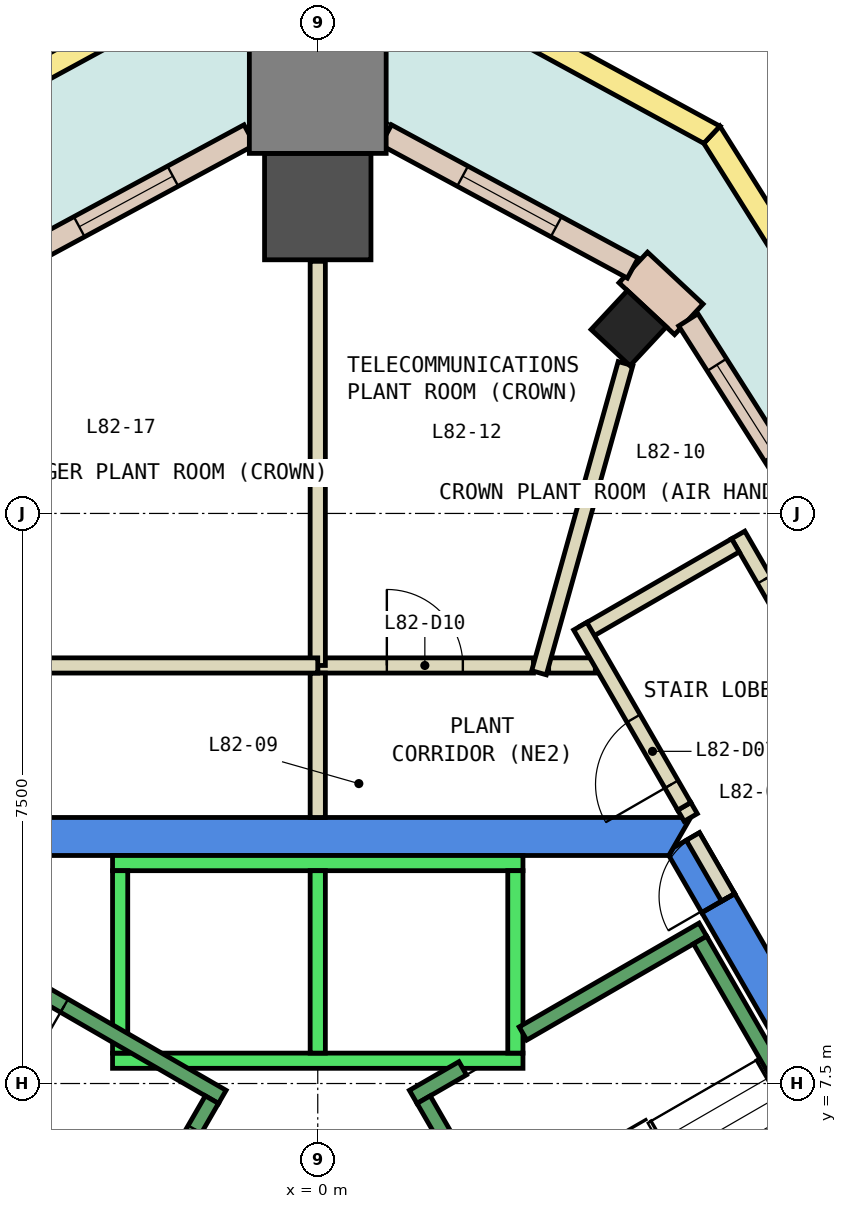
"""IFC4 building model, lengths in metres.
Left out: names, types, materials, properties, quantities, classifications, styles, units other than length and angle.
Written with IfcOpenShell. Run it as: python <this file> out.ifc"""

import sys

from ifc_helpers import new_model, si_unit, direction, frame, frame_2d, origin, origin_2d, place, context, subcontext, project, spatial, polyline, rectangle, outline, extrude, element, fill, save


model = new_model("IFC4")
c1 = context("Model", 3, precision=1e-05, world=origin(), true_north=direction((0.0, 1.0)))
c2 = subcontext(c1, "Body", "Model", "MODEL_VIEW")
j1 = project(units=[si_unit("LENGTHUNIT", "METRE"), si_unit("PLANEANGLEUNIT", "RADIAN")], contexts=[c1])
p1 = place(None, origin())
s1 = spatial("IfcSite", under=j1, at=p1, CompositionType="ELEMENT")
p2 = place(p1, origin())
s2 = spatial("IfcBuilding", under=s1, at=p2, CompositionType="ELEMENT")
p3 = place(p2, frame((0.0, 0.0, 349.4)))
s3 = spatial("IfcBuildingStorey", under=s2, at=p3, CompositionType="ELEMENT", Elevation=349.4)
p4 = place(p3, frame((4.091, 17.437, 0.0), z_axis=(0.0, 0.0, 1.0), x_axis=(-0.731734487274, 0.681589788754, 0.0)))
e1 = element("IfcColumn", 1, at=p4, inside=s3, PredefinedType="COLUMN", context=c2, shape_type="SweptSolid", body=[
    extrude(rectangle(XDim=0.7, YDim=0.7, at=origin_2d()), origin(), (0.0, 0.0, 1.0), 4.15),
])
p5 = place(p3, frame((0.0, 19.037, 0.0), z_axis=(0.0, 0.0, 1.0), x_axis=(0.0, 1.0, 0.0)))
e2 = element("IfcColumn", 2, at=p5, inside=s3, PredefinedType="COLUMN", context=c2, shape_type="SweptSolid", body=[
    extrude(rectangle(XDim=1.4, YDim=1.4, at=origin_2d()), origin(), (0.0, 0.0, 1.0), 4.15),
])
p6 = place(p3, frame((0.0, 20.637, 0.0), z_axis=(0.0, 0.0, 1.0), x_axis=(0.0, 1.0, 0.0)))
e3 = element("IfcColumn", 3, at=p6, inside=s3, PredefinedType="COLUMN", context=c2, shape_type="SweptSolid", body=[
    extrude(rectangle(XDim=1.8, YDim=1.8, at=origin_2d()), origin(), (0.0, 0.0, 1.0), 4.15),
])
p7 = place(p3, frame((0.0, 0.0, -0.45)))
e4 = element("IfcWall", 4, at=p7, inside=s3, PredefinedType="SHEAR", context=c2, shape_type="SweptSolid", body=[
    extrude(outline(polyline([(5.486, 9.998), (5.053, 9.748), (9.238, 2.5), (9.815, 2.5), (5.486, 9.998)])), origin(), (0.0, 0.0, 1.0), 4.6),
])
p8 = place(p3, frame((0.0, 0.0, 3.6)))
e5 = element("IfcWall", 5, at=p8, inside=s3, PredefinedType="SHEAR", context=c2, shape_type="SweptSolid", body=[
    extrude(outline(polyline([(5.022, 10.8), (4.677, 10.601), (4.619, 10.5), (5.053, 9.748), (5.486, 9.998), (5.022, 10.8)])), origin(), (0.0, 0.0, 1.0), 0.55),
])
p9 = place(p3, frame((0.0, 0.0, -0.45)))
e6 = element("IfcWall", 6, at=p9, inside=s3, PredefinedType="SHEAR", context=c2, shape_type="SweptSolid", body=[
    extrude(outline(polyline([(4.907, 11.0), (-4.907, 11.0), (-4.619, 10.5), (4.619, 10.5), (4.907, 11.0)])), origin(), (0.0, 0.0, 1.0), 4.6),
])
p10 = place(p3, frame((4.882, 17.554, 0.0), z_axis=(0.0, 0.0, 1.0), x_axis=(-0.731217625008, 0.682144255182, 0.0)))
e7 = element("IfcWall", 7, at=p10, inside=s3, PredefinedType="STANDARD", context=c2, shape_type="SweptSolid", body=[
    extrude(rectangle(XDim=1.0, YDim=0.55, at=frame_2d((0.5, 0.0))), origin(), (0.0, 0.0, 1.0), 4.15),
])
p11 = place(p3, frame((7.883, 12.816, 0.0), z_axis=(0.0, 0.0, 1.0), x_axis=(-0.536531689467, 0.84388017289, 0.0)))
e8 = element("IfcWall", 8, at=p11, inside=s3, PredefinedType="STANDARD", context=c2, shape_type="SweptSolid", body=[
    extrude(rectangle(XDim=5.606, YDim=0.3, at=frame_2d((2.803, 0.0))), origin(), (0.0, 0.0, 1.0), 4.15),
])
p12 = place(p11, frame((0.702, 0.0, 0.9)))
e9 = element("IfcOpeningElement", 9, at=p12, cuts=e8, PredefinedType="OPENING", context=c2, shape_type="SweptSolid", body=[
    extrude(rectangle(XDim=1.4, YDim=3.0, at=frame_2d((0.7, 1.5))), frame((0.0, 0.16, 0.0), z_axis=(0.0, -1.0, 0.0), x_axis=(1.0, 0.0, 0.0)), (0.0, 0.0, 1.0), 0.32),
])
p13 = place(p11, frame((3.505, 0.0, 0.9)))
e10 = element("IfcOpeningElement", 10, at=p13, cuts=e8, PredefinedType="OPENING", context=c2, shape_type="SweptSolid", body=[
    extrude(rectangle(XDim=1.4, YDim=3.0, at=frame_2d((0.7, 1.5))), frame((0.0, 0.16, 0.0), z_axis=(0.0, -1.0, 0.0), x_axis=(1.0, 0.0, 0.0)), (0.0, 0.0, 1.0), 0.32),
])
p14 = place(p3, frame((4.145, 18.228, 0.0), z_axis=(0.0, 0.0, 1.0), x_axis=(-0.879900970731, 0.475157112654, 0.0)))
e11 = element("IfcWall", 11, at=p14, inside=s3, PredefinedType="STANDARD", context=c2, shape_type="SweptSolid", body=[
    extrude(rectangle(XDim=3.689, YDim=0.3, at=frame_2d((1.845, 0.0))), origin(), (0.0, 0.0, 1.0), 4.15),
])
p15 = place(p14, frame((1.145, 0.0, 0.9)))
e12 = element("IfcOpeningElement", 12, at=p15, cuts=e11, PredefinedType="OPENING", context=c2, shape_type="SweptSolid", body=[
    extrude(rectangle(XDim=1.4, YDim=3.0, at=frame_2d((0.7, 1.5))), frame((0.0, 0.16, 0.0), z_axis=(0.0, -1.0, 0.0), x_axis=(1.0, 0.0, 0.0)), (0.0, 0.0, 1.0), 0.32),
])
p16 = place(p3, frame((-0.899, 19.981, 0.0), z_axis=(0.0, 0.0, 1.0), x_axis=(-0.879900970731, -0.475157112654, 0.0)))
e13 = element("IfcWall", 13, at=p16, inside=s3, PredefinedType="STANDARD", context=c2, shape_type="SweptSolid", body=[
    extrude(rectangle(XDim=3.689, YDim=0.3, at=frame_2d((1.845, 0.0))), origin(), (0.0, 0.0, 1.0), 4.15),
])
p17 = place(p16, frame((1.145, 0.0, 0.9)))
e14 = element("IfcOpeningElement", 14, at=p17, cuts=e13, PredefinedType="OPENING", context=c2, shape_type="SweptSolid", body=[
    extrude(rectangle(XDim=1.4, YDim=3.0, at=frame_2d((0.7, 1.5))), frame((0.0, 0.16, 0.0), z_axis=(0.0, -1.0, 0.0), x_axis=(1.0, 0.0, 0.0)), (0.0, 0.0, 1.0), 0.32),
])
p18 = place(p3, origin())
e15 = element("IfcWall", 15, at=p18, inside=s3, PredefinedType="PARAPET", context=c2, shape_type="SweptSolid", body=[
    extrude(outline(polyline([(9.22, 13.846), (5.291, 20.095), (5.079, 19.869), (8.964, 13.69), (9.22, 13.846)])), origin(), (0.0, 0.0, 1.0), 1.1),
])
p19 = place(p3, origin())
e16 = element("IfcWall", 16, at=p19, inside=s3, PredefinedType="PARAPET", context=c2, shape_type="SweptSolid", body=[
    extrude(outline(polyline([(5.291, 20.095), (0.0, 22.976), (0.0, 22.634), (5.079, 19.869), (5.291, 20.095)])), origin(), (0.0, 0.0, 1.0), 1.1),
])
p20 = place(p3, origin())
e17 = element("IfcWall", 17, at=p20, inside=s3, PredefinedType="PARAPET", context=c2, shape_type="SweptSolid", body=[
    extrude(outline(polyline([(0.0, 22.976), (-5.291, 20.095), (-5.079, 19.869), (0.0, 22.634), (0.0, 22.976)])), origin(), (0.0, 0.0, 1.0), 1.1),
])
p21 = place(p3, frame((4.907, 11.0, 0.0), z_axis=(0.0, 0.0, 1.0), x_axis=(-0.5004692653, 0.865754303766, 0.0)))
e18 = element("IfcWall", 18, at=p21, inside=s3, PredefinedType="PARTITIONING", context=c2, shape_type="SweptSolid", body=[
    extrude(rectangle(XDim=0.17, YDim=0.2, at=frame_2d((0.085, 0.0))), origin(), (0.0, 0.0, 1.0), 2.4),
])
p22 = place(p3, frame((5.532, 14.717, 0.0), z_axis=(0.0, 0.0, 1.0), x_axis=(0.499916141899, -0.866073813868, 0.0)))
e19 = element("IfcWall", 19, at=p22, inside=s3, PredefinedType="PARTITIONING", context=c2, shape_type="SweptSolid", body=[
    extrude(rectangle(XDim=2.982, YDim=0.2, at=frame_2d((1.491, 0.0))), origin(), (0.0, 0.0, 1.0), 4.15),
])
p23 = place(p22, frame((0.68, 0.0, 0.0)))
e20 = element("IfcOpeningElement", 20, at=p23, cuts=e19, PredefinedType="OPENING", context=c2, shape_type="SweptSolid", body=[
    extrude(rectangle(XDim=1.0, YDim=2.1, at=frame_2d((0.5, 1.05))), frame((0.0, 0.11, 0.0), z_axis=(0.0, -1.0, 0.0), x_axis=(1.0, 0.0, 0.0)), (0.0, 0.0, 1.0), 0.22),
])
p24 = place(p3, frame((3.504, 13.43, 0.0), z_axis=(0.0, 0.0, 1.0), x_axis=(0.865927408828, 0.500169693844, 0.0)))
e21 = element("IfcWall", 21, at=p24, inside=s3, PredefinedType="PARTITIONING", context=c2, shape_type="SweptSolid", body=[
    extrude(rectangle(XDim=2.3, YDim=0.2, at=frame_2d((1.15, 0.0))), origin(), (0.0, 0.0, 1.0), 4.15),
])
p25 = place(p3, frame((3.038, 13.0, 0.0), z_axis=(0.0, 0.0, 1.0), x_axis=(1.0, 0.0, 0.0)))
e22 = element("IfcWall", 22, at=p25, inside=s3, PredefinedType="PARTITIONING", context=c2, shape_type="SweptSolid", body=[
    extrude(rectangle(XDim=0.614, YDim=0.2, at=frame_2d((0.307, 0.0))), origin(), (0.0, 0.0, 1.0), 4.15),
])
p26 = place(p3, frame((0.0, 13.0, 0.0), z_axis=(0.0, 0.0, 1.0), x_axis=(1.0, 0.0, 0.0)))
e23 = element("IfcWall", 23, at=p26, inside=s3, PredefinedType="PARTITIONING", context=c2, shape_type="SweptSolid", body=[
    extrude(rectangle(XDim=2.838, YDim=0.2, at=frame_2d((1.419, 0.0))), origin(), (0.0, 0.0, 1.0), 4.15),
])
p27 = place(p26, frame((0.909, 0.0, 0.0)))
e24 = element("IfcOpeningElement", 24, at=p27, cuts=e23, PredefinedType="OPENING", context=c2, shape_type="SweptSolid", body=[
    extrude(rectangle(XDim=1.0, YDim=2.1, at=frame_2d((0.5, 1.05))), frame((0.0, 0.11, 0.0), z_axis=(0.0, -1.0, 0.0), x_axis=(1.0, 0.0, 0.0)), (0.0, 0.0, 1.0), 0.22),
])
p28 = place(p3, frame((0.0, 11.0, 0.0), z_axis=(0.0, 0.0, 1.0), x_axis=(0.0, 1.0, 0.0)))
e25 = element("IfcWall", 25, at=p28, inside=s3, PredefinedType="PARTITIONING", context=c2, shape_type="SweptSolid", body=[
    extrude(rectangle(XDim=1.9, YDim=0.2, at=frame_2d((0.95, 0.0))), origin(), (0.0, 0.0, 1.0), 4.15),
])
p29 = place(p3, frame((2.911, 12.904, 0.0), z_axis=(0.0, 0.0, 1.0), x_axis=(0.269509843473, 0.962997634614, 0.0)))
e26 = element("IfcWall", 26, at=p29, inside=s3, PredefinedType="PARTITIONING", context=c2, shape_type="SweptSolid", body=[
    extrude(rectangle(XDim=4.223, YDim=0.2, at=frame_2d((2.112, 0.0))), origin(), (0.0, 0.0, 1.0), 4.15),
])
p30 = place(p3, frame((0.0, 13.0, 0.0), z_axis=(0.0, 0.0, 1.0), x_axis=(0.0, 1.0, 0.0)))
e27 = element("IfcWall", 27, at=p30, inside=s3, PredefinedType="PARTITIONING", context=c2, shape_type="SweptSolid", body=[
    extrude(rectangle(XDim=5.317, YDim=0.2, at=frame_2d((2.658, 0.0))), origin(), (0.0, 0.0, 1.0), 4.15),
])
p31 = place(p3, frame((-5.962, 13.0, 0.0), z_axis=(0.0, 0.0, 1.0), x_axis=(1.0, 0.0, 0.0)))
e28 = element("IfcWall", 28, at=p31, inside=s3, PredefinedType="PARTITIONING", context=c2, shape_type="SweptSolid", body=[
    extrude(rectangle(XDim=5.962, YDim=0.2, at=frame_2d((2.981, 0.0))), origin(), (0.0, 0.0, 1.0), 4.15),
])
p32 = place(p31, frame((0.1, 0.0, 0.0)))
e29 = element("IfcOpeningElement", 29, at=p32, cuts=e28, PredefinedType="OPENING", context=c2, shape_type="SweptSolid", body=[
    extrude(rectangle(XDim=1.0, YDim=2.1, at=frame_2d((0.5, 1.05))), frame((0.0, 0.11, 0.0), z_axis=(0.0, -1.0, 0.0), x_axis=(1.0, 0.0, 0.0)), (0.0, 0.0, 1.0), 0.22),
])
p33 = place(p3, frame((5.399, 9.948, 0.0), z_axis=(0.0, 0.0, 1.0), x_axis=(-0.499882215713, 0.866093395895, 0.0)))
e30 = element("IfcWall", 30, at=p33, inside=s3, PredefinedType="PARTITIONING", context=c2, shape_type="SweptSolid", body=[
    extrude(rectangle(XDim=0.926, YDim=0.2, at=frame_2d((0.463, 0.0))), origin(), (0.0, 0.0, 1.0), 2.4),
])
p34 = place(p33, frame((0.017, 0.0, 0.0)))
e31 = element("IfcOpeningElement", 31, at=p34, cuts=e30, PredefinedType="OPENING", context=c2, shape_type="SweptSolid", body=[
    extrude(rectangle(XDim=0.9, YDim=2.1, at=frame_2d((0.45, 1.05))), frame((0.0, 0.11, 0.0), z_axis=(0.0, -1.0, 0.0), x_axis=(1.0, 0.0, 0.0)), (0.0, 0.0, 1.0), 0.22),
])
p35 = place(p3, frame((4.822, 11.147, 0.0), z_axis=(0.0, 0.0, 1.0), x_axis=(-0.499871764879, 0.866099427708, 0.0)))
e32 = element("IfcWall", 32, at=p35, inside=s3, PredefinedType="PARTITIONING", context=c2, shape_type="SweptSolid", body=[
    extrude(rectangle(XDim=2.737, YDim=0.2, at=frame_2d((1.368, 0.0))), origin(), (0.0, 0.0, 1.0), 4.15),
])
p36 = place(p35, frame((0.335, 0.0, 0.0)))
e33 = element("IfcOpeningElement", 33, at=p36, cuts=e32, PredefinedType="OPENING", context=c2, shape_type="SweptSolid", body=[
    extrude(rectangle(XDim=1.0, YDim=2.1, at=frame_2d((0.5, 1.05))), frame((0.0, 0.11, 0.0), z_axis=(0.0, -1.0, 0.0), x_axis=(1.0, 0.0, 0.0)), (0.0, 0.0, 1.0), 0.22),
])
for number, where, z_axis, x_axis in (
    (34, (2.7, 7.8, 0.0), (0.0, 0.0, 1.0), (-1.0, 0.0, 0.0)),
    (35, (2.7, 10.4, 0.0), (0.0, 0.0, 1.0), (-1.0, 0.0, 0.0)),
):
    element("IfcWall", number, at=place(p3, frame(where, z_axis=z_axis, x_axis=x_axis)), inside=s3, PredefinedType="STANDARD", context=c2, shape_type="SweptSolid", body=[
        extrude(rectangle(XDim=5.4, YDim=0.2, at=frame_2d((2.7, 0.0))), origin(), (0.0, 0.0, 1.0), 4.15),
    ])
for number, where, z_axis, x_axis in (
    (36, (2.6, 7.9, 0.0), (0.0, 0.0, 1.0), (0.0, 1.0, 0.0)),
    (37, (0.0, 7.9, 0.0), (0.0, 0.0, 1.0), (0.0, 1.0, 0.0)),
    (38, (-2.6, 7.9, 0.0), (0.0, 0.0, 1.0), (0.0, 1.0, 0.0)),
):
    element("IfcWall", number, at=place(p3, frame(where, z_axis=z_axis, x_axis=x_axis)), inside=s3, PredefinedType="STANDARD", context=c2, shape_type="SweptSolid", body=[
        extrude(rectangle(XDim=2.4, YDim=0.2, at=frame_2d((1.2, 0.0))), origin(), (0.0, 0.0, 1.0), 4.15),
    ])
p37 = place(p3, frame((2.7, 8.158, 0.0), z_axis=(0.0, 0.0, 1.0), x_axis=(0.86611865017, 0.499838457731, 0.0)))
e39 = element("IfcWall", 39, at=p37, inside=s3, PredefinedType="STANDARD", context=c2, shape_type="SweptSolid", body=[
    extrude(rectangle(XDim=2.733, YDim=0.2, at=frame_2d((1.366, 0.0))), origin(), (0.0, 0.0, 1.0), 4.15),
])
p38 = place(p3, frame((1.256, 7.324, 0.0), z_axis=(0.0, 0.0, 1.0), x_axis=(0.865915093549, 0.500191014278, 0.0)))
e40 = element("IfcWall", 40, at=p38, inside=s3, PredefinedType="STANDARD", context=c2, shape_type="SweptSolid", body=[
    extrude(rectangle(XDim=0.752, YDim=0.2, at=frame_2d((0.376, 0.0))), origin(), (0.0, 0.0, 1.0), 4.15),
])
p39 = place(p3, frame((4.843, 1.312, 0.0), z_axis=(0.0, 0.0, 1.0), x_axis=(-0.499963383562, 0.866046543262, 0.0)))
e41 = element("IfcWall", 41, at=p39, inside=s3, PredefinedType="STANDARD", context=c2, shape_type="SweptSolid", body=[
    extrude(rectangle(XDim=6.9, YDim=0.2, at=frame_2d((3.45, 0.0))), origin(), (0.0, 0.0, 1.0), 4.15),
])
p40 = place(p39, frame((0.45, 0.0, 0.0)))
e42 = element("IfcOpeningElement", 42, at=p40, cuts=e41, PredefinedType="OPENING", context=c2, shape_type="SweptSolid", body=[
    extrude(rectangle(XDim=1.1, YDim=2.2, at=frame_2d((0.55, 1.1))), frame((0.0, 0.11, 0.0), z_axis=(0.0, -1.0, 0.0), x_axis=(1.0, 0.0, 0.0)), (0.0, 0.0, 1.0), 0.22),
])
p41 = place(p3, frame((8.48, 3.412, 0.0), z_axis=(0.0, 0.0, 1.0), x_axis=(-0.499978703459, 0.866037698999, 0.0)))
e43 = element("IfcWall", 43, at=p41, inside=s3, PredefinedType="STANDARD", context=c2, shape_type="SweptSolid", body=[
    extrude(rectangle(XDim=6.9, YDim=0.2, at=frame_2d((3.45, 0.0))), origin(), (0.0, 0.0, 1.0), 4.15),
])
p42 = place(p3, frame((-1.256, 7.324, 0.0), z_axis=(0.0, 0.0, 1.0), x_axis=(-0.866046073146, 0.499964197906, 0.0)))
e44 = element("IfcWall", 44, at=p42, inside=s3, PredefinedType="STANDARD", context=c2, shape_type="SweptSolid", body=[
    extrude(rectangle(XDim=4.4, YDim=0.2, at=frame_2d((2.2, 0.0))), origin(), (0.0, 0.0, 1.0), 4.15),
])
p43 = place(p42, frame((2.4, 0.0, 0.0)))
e45 = element("IfcOpeningElement", 45, at=p43, cuts=e44, PredefinedType="OPENING", context=c2, shape_type="SweptSolid", body=[
    extrude(rectangle(XDim=1.1, YDim=2.2, at=frame_2d((0.55, 1.1))), frame((0.0, 0.11, 0.0), z_axis=(0.0, -1.0, 0.0), x_axis=(1.0, 0.0, 0.0)), (0.0, 0.0, 1.0), 0.22),
])
p44 = place(p3, frame((-1.393, 7.288, 0.0), z_axis=(0.0, 0.0, 1.0), x_axis=(-0.499963383562, -0.866046543262, 0.0)))
e46 = element("IfcWall", 46, at=p44, inside=s3, PredefinedType="STANDARD", context=c2, shape_type="SweptSolid", body=[
    extrude(rectangle(XDim=6.9, YDim=0.2, at=frame_2d((3.45, 0.0))), origin(), (0.0, 0.0, 1.0), 4.15),
])
p45 = place(p44, frame((0.45, 0.0, 0.0)))
e47 = element("IfcOpeningElement", 47, at=p45, cuts=e46, PredefinedType="OPENING", context=c2, shape_type="SweptSolid", body=[
    extrude(rectangle(XDim=1.1, YDim=2.2, at=frame_2d((0.55, 1.1))), frame((0.0, 0.11, 0.0), z_axis=(0.0, -1.0, 0.0), x_axis=(1.0, 0.0, 0.0)), (0.0, 0.0, 1.0), 0.22),
])
p46 = place(p13, origin())
e48 = element("IfcWindow", 48, at=p46, inside=s3, PartitioningType="SINGLE_PANEL", PredefinedType="WINDOW", context=c2, shape_type="SweptSolid", body=[
    extrude(rectangle(XDim=1.4, YDim=3.0, at=frame_2d((0.7, 1.5))), frame((0.0, 0.03, 0.0), z_axis=(0.0, -1.0, 0.0), x_axis=(1.0, 0.0, 0.0)), (0.0, 0.0, 1.0), 0.06),
])
fill(e10, e48)
p47 = place(p15, origin())
e49 = element("IfcWindow", 49, at=p47, inside=s3, PartitioningType="SINGLE_PANEL", PredefinedType="WINDOW", context=c2, shape_type="SweptSolid", body=[
    extrude(rectangle(XDim=1.4, YDim=3.0, at=frame_2d((0.7, 1.5))), frame((0.0, 0.03, 0.0), z_axis=(0.0, -1.0, 0.0), x_axis=(1.0, 0.0, 0.0)), (0.0, 0.0, 1.0), 0.06),
])
fill(e12, e49)
p48 = place(p17, origin())
e50 = element("IfcWindow", 50, at=p48, inside=s3, PartitioningType="SINGLE_PANEL", PredefinedType="WINDOW", context=c2, shape_type="SweptSolid", body=[
    extrude(rectangle(XDim=1.4, YDim=3.0, at=frame_2d((0.7, 1.5))), frame((0.0, 0.03, 0.0), z_axis=(0.0, -1.0, 0.0), x_axis=(1.0, 0.0, 0.0)), (0.0, 0.0, 1.0), 0.06),
])
fill(e14, e50)
p49 = place(p36, origin())
e51 = element("IfcDoor", 51, at=p49, inside=s3, OperationType="SINGLE_SWING_RIGHT", PredefinedType="DOOR", context=c2, shape_type="SweptSolid", body=[
    extrude(rectangle(XDim=1.0, YDim=2.1, at=frame_2d((0.5, 1.05))), frame((0.0, 0.025, 0.0), z_axis=(0.0, -1.0, 0.0), x_axis=(1.0, 0.0, 0.0)), (0.0, 0.0, 1.0), 0.05),
])
fill(e33, e51)
p50 = place(p23, origin())
e52 = element("IfcDoor", 52, at=p50, inside=s3, OperationType="SINGLE_SWING_LEFT", PredefinedType="DOOR", context=c2, shape_type="SweptSolid", body=[
    extrude(rectangle(XDim=1.0, YDim=2.1, at=frame_2d((0.5, 1.05))), frame((0.0, 0.025, 0.0), z_axis=(0.0, -1.0, 0.0), x_axis=(1.0, 0.0, 0.0)), (0.0, 0.0, 1.0), 0.05),
])
fill(e20, e52)
p51 = place(p27, origin())
e53 = element("IfcDoor", 53, at=p51, inside=s3, OperationType="SINGLE_SWING_LEFT", PredefinedType="DOOR", context=c2, shape_type="SweptSolid", body=[
    extrude(rectangle(XDim=1.0, YDim=2.1, at=frame_2d((0.5, 1.05))), frame((0.0, 0.025, 0.0), z_axis=(0.0, -1.0, 0.0), x_axis=(1.0, 0.0, 0.0)), (0.0, 0.0, 1.0), 0.05),
])
fill(e24, e53)
p52 = place(p34, origin())
e54 = element("IfcDoor", 54, at=p52, inside=s3, OperationType="SINGLE_SWING_LEFT", PredefinedType="DOOR", context=c2, shape_type="SweptSolid", body=[
    extrude(rectangle(XDim=0.9, YDim=2.1, at=frame_2d((0.45, 1.05))), frame((0.0, 0.025, 0.0), z_axis=(0.0, -1.0, 0.0), x_axis=(1.0, 0.0, 0.0)), (0.0, 0.0, 1.0), 0.05),
])
fill(e31, e54)
p53 = place(p45, origin())
e55 = element("IfcDoor", 55, at=p53, inside=s3, OperationType="SINGLE_SWING_LEFT", PredefinedType="DOOR", context=c2, shape_type="SweptSolid", body=[
    extrude(rectangle(XDim=1.1, YDim=2.2, at=frame_2d((0.55, 1.1))), frame((0.0, 0.025, 0.0), z_axis=(0.0, -1.0, 0.0), x_axis=(1.0, 0.0, 0.0)), (0.0, 0.0, 1.0), 0.05),
])
fill(e47, e55)
p54 = place(p43, origin())
e56 = element("IfcDoor", 56, at=p54, inside=s3, OperationType="SINGLE_SWING_LEFT", PredefinedType="DOOR", context=c2, shape_type="SweptSolid", body=[
    extrude(rectangle(XDim=1.1, YDim=2.2, at=frame_2d((0.55, 1.1))), frame((0.0, 0.025, 0.0), z_axis=(0.0, -1.0, 0.0), x_axis=(1.0, 0.0, 0.0)), (0.0, 0.0, 1.0), 0.05),
])
fill(e45, e56)
save(model, sys.argv[1])
